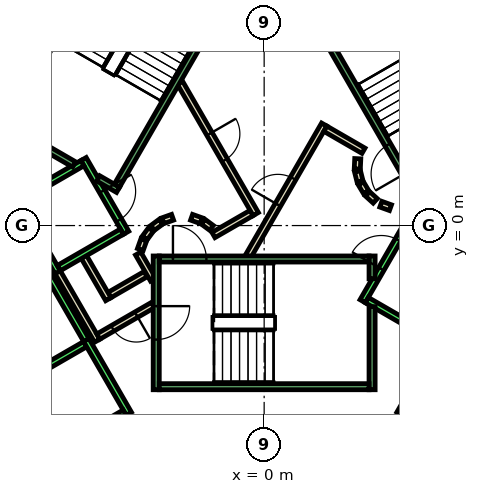
"""IFC4 building model, lengths in metres.
Left out: names, types, materials, properties, quantities, classifications, styles, units other than length and angle.
Written with IfcOpenShell. Run it as: python <this file> out.ifc"""

import sys

from ifc_helpers import new_model, si_unit, direction, frame, frame_2d, origin, place, context, subcontext, project, spatial, polyline, rectangle, outline, extrude, element, fill, save


model = new_model("IFC4")
c1 = context("Model", 3, precision=1e-05, world=origin(), true_north=direction((0.0, 1.0)))
c2 = subcontext(c1, "Body", "Model", "MODEL_VIEW")
j1 = project(units=[si_unit("LENGTHUNIT", "METRE"), si_unit("PLANEANGLEUNIT", "RADIAN")], contexts=[c1])
p1 = place(None, origin())
s1 = spatial("IfcSite", under=j1, at=p1, CompositionType="ELEMENT")
p2 = place(p1, origin())
s2 = spatial("IfcBuilding", under=s1, at=p2, CompositionType="ELEMENT")
p3 = place(p2, frame((0.0, 0.0, -5.5)))
s3 = spatial("IfcBuildingStorey", under=s2, at=p3, CompositionType="ELEMENT", Elevation=-5.5)
p4 = place(p3, frame((0.0, 0.0, -0.42)))
e1 = element("IfcWall", 1, at=p4, inside=s3, PredefinedType="SHEAR", context=c2, shape_type="SweptSolid", body=[
    extrude(outline(polyline([(-12.267, 5.252), (-11.402, 4.752), (-6.351, 13.5), (-6.928, 14.5), (-12.267, 5.252)])), origin(), (0.0, 0.0, 1.0), 5.42),
])
p5 = place(p3, frame((0.0, 0.0, -0.42)))
e2 = element("IfcWall", 2, at=p5, inside=s3, PredefinedType="SHEAR", context=c2, shape_type="SweptSolid", body=[
    extrude(outline(polyline([(-13.856, 2.5), (-6.928, -9.5), (-6.351, -8.5), (-12.702, 2.5), (-13.856, 2.5)])), origin(), (0.0, 0.0, 1.0), 5.42),
])
p6 = place(p3, frame((-3.9, -1.599, 0.0), z_axis=(0.0, 0.0, 1.0), x_axis=(-0.865969445389, -0.500096910261, 0.0)))
e3 = element("IfcWall", 3, at=p6, inside=s3, PredefinedType="PARTITIONING", context=c2, shape_type="SweptSolid", body=[
    extrude(rectangle(XDim=1.373, YDim=0.2, at=frame_2d((0.687, 0.0))), origin(), (0.0, 0.0, 1.0), 4.9),
])
p7 = place(p3, frame((-5.126, -2.422, 0.0), z_axis=(0.0, 0.0, 1.0), x_axis=(-0.500062241894, 0.865989465428, 0.0)))
e4 = element("IfcWall", 4, at=p7, inside=s3, PredefinedType="PARTITIONING", context=c2, shape_type="SweptSolid", body=[
    extrude(rectangle(XDim=1.7, YDim=0.2, at=frame_2d((0.85, 0.0))), origin(), (0.0, 0.0, 1.0), 4.9),
])
p8 = place(p3, frame((-5.492, -3.788, 0.0), z_axis=(0.0, 0.0, 1.0), x_axis=(-0.500008949224, 0.866020236886, 0.0)))
e5 = element("IfcWall", 5, at=p8, inside=s3, PredefinedType="PARTITIONING", context=c2, shape_type="SweptSolid", body=[
    extrude(rectangle(XDim=2.68, YDim=0.2, at=frame_2d((1.34, 0.0))), origin(), (0.0, 0.0, 1.0), 4.9),
])
p9 = place(p3, frame((-4.145, -0.92, 0.0), z_axis=(0.0, 0.0, 1.0), x_axis=(0.499743786207, -0.866173278362, 0.0)))
e6 = element("IfcWall", 6, at=p9, inside=s3, PredefinedType="PARTITIONING", context=c2, shape_type="SweptSolid", body=[
    extrude(rectangle(XDim=0.991, YDim=0.2, at=frame_2d((0.495, 0.0))), origin(), (0.0, 0.0, 1.0), 4.9),
])
p10 = place(p3, frame((-3.65, -2.61, 0.0), z_axis=(0.0, 0.0, 1.0), x_axis=(-0.866072462134, -0.499918483688, 0.0)))
e7 = element("IfcWall", 7, at=p10, inside=s3, PredefinedType="PARTITIONING", context=c2, shape_type="SweptSolid", body=[
    extrude(rectangle(XDim=2.084, YDim=0.2, at=frame_2d((1.042, 0.0))), origin(), (0.0, 0.0, 1.0), 4.9),
])
p11 = place(p10, frame((0.642, 0.0, 0.0)))
e8 = element("IfcOpeningElement", 8, at=p11, cuts=e7, PredefinedType="OPENING", context=c2, shape_type="SweptSolid", body=[
    extrude(rectangle(XDim=0.9, YDim=2.1, at=frame_2d((0.45, 1.05))), frame((0.0, 0.11, 0.0), z_axis=(0.0, -1.0, 0.0), x_axis=(1.0, 0.0, 0.0)), (0.0, 0.0, 1.0), 0.22),
])
p12 = place(p3, frame((3.079, 2.199, 0.0), z_axis=(0.0, 0.0, 1.0), x_axis=(-0.047771483479, -0.998858290933, 0.0)))
e9 = element("IfcWall", 9, at=p12, inside=s3, PredefinedType="PARTITIONING", context=c2, shape_type="SweptSolid", body=[
    extrude(rectangle(XDim=0.337, YDim=0.2, at=frame_2d((0.169, 0.0))), origin(), (0.0, 0.0, 1.0), 4.9),
])
p13 = place(p3, frame((3.07, 1.786, 0.0), z_axis=(0.0, 0.0, 1.0), x_axis=(0.242705583207, -0.970099994784, 0.0)))
e10 = element("IfcWall", 10, at=p13, inside=s3, PredefinedType="PARTITIONING", context=c2, shape_type="SweptSolid", body=[
    extrude(rectangle(XDim=0.338, YDim=0.2, at=frame_2d((0.169, 0.0))), origin(), (0.0, 0.0, 1.0), 4.9),
])
for number, where, z_axis, x_axis in (
    (11, (3.182, 1.388, 0.0), (0.0, 0.0, 1.0), (0.512, -0.859, 0.0)),
    (12, (3.404, 1.039, 0.0), (0.0, 0.0, 1.0), (0.74, -0.672, 0.0)),
):
    element("IfcWall", number, at=place(p3, frame(where, z_axis=z_axis, x_axis=x_axis)), inside=s3, PredefinedType="PARTITIONING", context=c2, shape_type="SweptSolid", body=[
        extrude(rectangle(XDim=0.338, YDim=0.2, at=frame_2d((0.169, 0.0))), origin(), (0.0, 0.0, 1.0), 4.9),
    ])
p14 = place(p3, frame((3.838, 0.702, 0.0), z_axis=(0.0, 0.0, 1.0), x_axis=(0.941035081519, -0.338308993895, 0.0)))
e13 = element("IfcWall", 13, at=p14, inside=s3, PredefinedType="PARTITIONING", context=c2, shape_type="SweptSolid", body=[
    extrude(rectangle(XDim=0.337, YDim=0.2, at=frame_2d((0.168, 0.0))), origin(), (0.0, 0.0, 1.0), 4.9),
])
p15 = place(p3, frame((-0.52, -1.0, 0.0), z_axis=(0.0, 0.0, 1.0), x_axis=(0.50011622646, 0.865958290007, 0.0)))
e14 = element("IfcWall", 14, at=p15, inside=s3, PredefinedType="PARTITIONING", context=c2, shape_type="SweptSolid", body=[
    extrude(rectangle(XDim=4.991, YDim=0.2, at=frame_2d((2.496, 0.0))), origin(), (0.0, 0.0, 1.0), 4.9),
])
p16 = place(p15, frame((1.945, 0.0, 0.0)))
e15 = element("IfcOpeningElement", 15, at=p16, cuts=e14, PredefinedType="OPENING", context=c2, shape_type="SweptSolid", body=[
    extrude(rectangle(XDim=1.0, YDim=2.1, at=frame_2d((0.5, 1.05))), frame((0.0, 0.11, 0.0), z_axis=(0.0, -1.0, 0.0), x_axis=(1.0, 0.0, 0.0)), (0.0, 0.0, 1.0), 0.22),
])
p17 = place(p3, frame((2.012, 3.186, 0.0), z_axis=(0.0, 0.0, 1.0), x_axis=(0.865891012941, -0.500232699559, 0.0)))
e16 = element("IfcWall", 16, at=p17, inside=s3, PredefinedType="PARTITIONING", context=c2, shape_type="SweptSolid", body=[
    extrude(rectangle(XDim=1.449, YDim=0.2, at=frame_2d((0.725, 0.0))), origin(), (0.0, 0.0, 1.0), 4.9),
])
p18 = place(p3, frame((-0.412, 0.414, 0.0), z_axis=(0.0, 0.0, 1.0), x_axis=(-0.866017369001, -0.500013916395, 0.0)))
e17 = element("IfcWall", 17, at=p18, inside=s3, PredefinedType="PARTITIONING", context=c2, shape_type="SweptSolid", body=[
    extrude(rectangle(XDim=1.45, YDim=0.2, at=frame_2d((0.725, 0.0))), origin(), (0.0, 0.0, 1.0), 4.9),
])
p19 = place(p3, frame((-1.731, -0.077, 0.0), z_axis=(0.0, 0.0, 1.0), x_axis=(-0.804311165252, 0.594208338422, 0.0)))
e18 = element("IfcWall", 18, at=p19, inside=s3, PredefinedType="PARTITIONING", context=c2, shape_type="SweptSolid", body=[
    extrude(rectangle(XDim=0.338, YDim=0.2, at=frame_2d((0.169, 0.0))), origin(), (0.0, 0.0, 1.0), 4.9),
])
p20 = place(p3, frame((-2.07, 0.16, 0.0), z_axis=(0.0, 0.0, 1.0), x_axis=(-0.942199461132, 0.335052496547, 0.0)))
e19 = element("IfcWall", 19, at=p20, inside=s3, PredefinedType="PARTITIONING", context=c2, shape_type="SweptSolid", body=[
    extrude(rectangle(XDim=0.337, YDim=0.2, at=frame_2d((0.169, 0.0))), origin(), (0.0, 0.0, 1.0), 4.9),
])
p21 = place(p3, frame((-3.012, 0.273, 0.0), z_axis=(0.0, 0.0, 1.0), x_axis=(-0.942280615813, -0.334824194261, 0.0)))
e20 = element("IfcWall", 20, at=p21, inside=s3, PredefinedType="PARTITIONING", context=c2, shape_type="SweptSolid", body=[
    extrude(rectangle(XDim=0.338, YDim=0.2, at=frame_2d((0.169, 0.0))), origin(), (0.0, 0.0, 1.0), 4.9),
])
p22 = place(p3, frame((-3.397, 0.124, 0.0), z_axis=(0.0, 0.0, 1.0), x_axis=(-0.804311165252, -0.594208338422, 0.0)))
e21 = element("IfcWall", 21, at=p22, inside=s3, PredefinedType="PARTITIONING", context=c2, shape_type="SweptSolid", body=[
    extrude(rectangle(XDim=0.338, YDim=0.2, at=frame_2d((0.169, 0.0))), origin(), (0.0, 0.0, 1.0), 4.9),
])
p23 = place(p3, frame((-3.723, -0.131, 0.0), z_axis=(0.0, 0.0, 1.0), x_axis=(-0.594675113454, -0.803966112121, 0.0)))
e22 = element("IfcWall", 22, at=p23, inside=s3, PredefinedType="PARTITIONING", context=c2, shape_type="SweptSolid", body=[
    extrude(rectangle(XDim=0.338, YDim=0.2, at=frame_2d((0.169, 0.0))), origin(), (0.0, 0.0, 1.0), 4.9),
])
p24 = place(p3, frame((-3.96, -0.47, 0.0), z_axis=(0.0, 0.0, 1.0), x_axis=(-0.334824194261, -0.942280615813, 0.0)))
e23 = element("IfcWall", 23, at=p24, inside=s3, PredefinedType="PARTITIONING", context=c2, shape_type="SweptSolid", body=[
    extrude(rectangle(XDim=0.338, YDim=0.2, at=frame_2d((0.169, 0.0))), origin(), (0.0, 0.0, 1.0), 4.9),
])
p25 = place(p3, frame((-2.771, 4.7, 0.0), z_axis=(0.0, 0.0, 1.0), x_axis=(0.499969479948, -0.866043023828, 0.0)))
e24 = element("IfcWall", 24, at=p25, inside=s3, PredefinedType="PARTITIONING", context=c2, shape_type="SweptSolid", body=[
    extrude(rectangle(XDim=4.99, YDim=0.2, at=frame_2d((2.495, 0.0))), origin(), (0.0, 0.0, 1.0), 4.9),
])
p26 = place(p25, frame((1.945, 0.0, 0.0)))
e25 = element("IfcOpeningElement", 25, at=p26, cuts=e24, PredefinedType="OPENING", context=c2, shape_type="SweptSolid", body=[
    extrude(rectangle(XDim=1.0, YDim=2.1, at=frame_2d((0.5, 1.05))), frame((0.0, 0.11, 0.0), z_axis=(0.0, -1.0, 0.0), x_axis=(1.0, 0.0, 0.0)), (0.0, 0.0, 1.0), 0.22),
])
p27 = place(p3, frame((-5.94, 2.188, 0.0), z_axis=(0.0, 0.0, 1.0), x_axis=(0.49994636267, -0.866056369097, 0.0)))
e26 = element("IfcWall", 26, at=p27, inside=s3, PredefinedType="STANDARD", context=c2, shape_type="SweptSolid", body=[
    extrude(rectangle(XDim=2.8, YDim=0.2, at=frame_2d((1.4, 0.0))), origin(), (0.0, 0.0, 1.0), 4.9),
])
p28 = place(p27, frame((1.225, 0.0, 0.0)))
e27 = element("IfcOpeningElement", 27, at=p28, cuts=e26, PredefinedType="OPENING", context=c2, shape_type="SweptSolid", body=[
    extrude(rectangle(XDim=1.1, YDim=2.1, at=frame_2d((0.55, 1.05))), frame((0.0, 0.11, 0.0), z_axis=(0.0, -1.0, 0.0), x_axis=(1.0, 0.0, 0.0)), (0.0, 0.0, 1.0), 0.22),
])
p29 = place(p3, frame((-8.192, 0.888, 0.0), z_axis=(0.0, 0.0, 1.0), x_axis=(0.49994636267, -0.866056369097, 0.0)))
e28 = element("IfcWall", 28, at=p29, inside=s3, PredefinedType="STANDARD", context=c2, shape_type="SweptSolid", body=[
    extrude(rectangle(XDim=2.8, YDim=0.2, at=frame_2d((1.4, 0.0))), origin(), (0.0, 0.0, 1.0), 4.9),
])
for number, where, z_axis, x_axis in (
    (29, (-5.977, 2.052, 0.0), (0.0, 0.0, 1.0), (-0.866, -0.5, 0.0)),
    (30, (-4.677, -0.2, 0.0), (0.0, 0.0, 1.0), (-0.866, -0.5, 0.0)),
):
    element("IfcWall", number, at=place(p3, frame(where, z_axis=z_axis, x_axis=x_axis)), inside=s3, PredefinedType="STANDARD", context=c2, shape_type="SweptSolid", body=[
        extrude(rectangle(XDim=2.399, YDim=0.2, at=frame_2d((1.2, 0.0))), origin(), (0.0, 0.0, 1.0), 4.9),
    ])
p30 = place(p3, frame((3.24, -2.488, 0.0), z_axis=(0.0, 0.0, 1.0), x_axis=(0.49994636267, 0.866056369097, 0.0)))
e31 = element("IfcWall", 31, at=p30, inside=s3, PredefinedType="STANDARD", context=c2, shape_type="SweptSolid", body=[
    extrude(rectangle(XDim=2.8, YDim=0.2, at=frame_2d((1.4, 0.0))), origin(), (0.0, 0.0, 1.0), 4.9),
])
p31 = place(p30, frame((1.225, 0.0, 0.0)))
e32 = element("IfcOpeningElement", 32, at=p31, cuts=e31, PredefinedType="OPENING", context=c2, shape_type="SweptSolid", body=[
    extrude(rectangle(XDim=1.1, YDim=2.1, at=frame_2d((0.55, 1.05))), frame((0.0, 0.11, 0.0), z_axis=(0.0, -1.0, 0.0), x_axis=(1.0, 0.0, 0.0)), (0.0, 0.0, 1.0), 0.22),
])
p32 = place(p3, frame((3.377, -2.452, 0.0), z_axis=(0.0, 0.0, 1.0), x_axis=(0.865955154139, -0.50012165622, 0.0)))
e33 = element("IfcWall", 33, at=p32, inside=s3, PredefinedType="STANDARD", context=c2, shape_type="SweptSolid", body=[
    extrude(rectangle(XDim=2.4, YDim=0.2, at=frame_2d((1.2, 0.0))), origin(), (0.0, 0.0, 1.0), 4.9),
])
p33 = place(p3, frame((4.451, -6.19, 0.0), z_axis=(0.0, 0.0, 1.0), x_axis=(0.500011755427, 0.866018616679, 0.0)))
e34 = element("IfcWall", 34, at=p33, inside=s3, PredefinedType="STANDARD", context=c2, shape_type="SweptSolid", body=[
    extrude(rectangle(XDim=2.8, YDim=0.2, at=frame_2d((1.4, 0.0))), origin(), (0.0, 0.0, 1.0), 3.6),
])
for number, where, z_axis, x_axis in (
    (35, (-8.451, 0.738, 0.0), (0.0, 0.0, 1.0), (0.5, -0.866, 0.0)),
    (36, (-7.151, -1.513, 0.0), (0.0, 0.0, 1.0), (0.5, -0.866, 0.0)),
):
    element("IfcWall", number, at=place(p3, frame(where, z_axis=z_axis, x_axis=x_axis)), inside=s3, PredefinedType="STANDARD", context=c2, shape_type="SweptSolid", body=[
        extrude(rectangle(XDim=2.8, YDim=0.2, at=frame_2d((1.4, 0.0))), origin(), (0.0, 0.0, 1.0), 3.6),
    ])
p34 = place(p3, frame((-5.888, -3.902, 0.0), z_axis=(0.0, 0.0, 1.0), x_axis=(-0.865999212041, -0.500045362686, 0.0)))
e37 = element("IfcWall", 37, at=p34, inside=s3, PredefinedType="STANDARD", context=c2, shape_type="SweptSolid", body=[
    extrude(rectangle(XDim=2.4, YDim=0.2, at=frame_2d((1.2, 0.0))), origin(), (0.0, 0.0, 1.0), 3.6),
])
for number, where, z_axis, x_axis in (
    (38, (-5.851, -3.765, 0.0), (0.0, 0.0, 1.0), (0.5, -0.866, 0.0)),
    (39, (-8.103, -5.065, 0.0), (0.0, 0.0, 1.0), (0.5, -0.866, 0.0)),
):
    element("IfcWall", number, at=place(p3, frame(where, z_axis=z_axis, x_axis=x_axis)), inside=s3, PredefinedType="STANDARD", context=c2, shape_type="SweptSolid", body=[
        extrude(rectangle(XDim=2.8, YDim=0.2, at=frame_2d((1.4, 0.0))), origin(), (0.0, 0.0, 1.0), 3.6),
    ])
p35 = place(p3, frame((-4.588, -6.153, 0.0), z_axis=(0.0, 0.0, 1.0), x_axis=(-0.865999212041, -0.500045362686, 0.0)))
e40 = element("IfcWall", 40, at=p35, inside=s3, PredefinedType="STANDARD", context=c2, shape_type="SweptSolid", body=[
    extrude(rectangle(XDim=2.4, YDim=0.2, at=frame_2d((1.2, 0.0))), origin(), (0.0, 0.0, 1.0), 3.6),
])
p36 = place(p3, frame((-3.55, -1.0, 0.0), z_axis=(0.0, 0.0, 1.0), x_axis=(0.0, -1.0, 0.0)))
e41 = element("IfcWall", 41, at=p36, inside=s3, PredefinedType="STANDARD", context=c2, shape_type="SweptSolid", body=[
    extrude(rectangle(XDim=4.4, YDim=0.2, at=frame_2d((2.2, 0.0))), origin(), (0.0, 0.0, 1.0), 4.9),
])
p37 = place(p36, frame((1.65, 0.0, 0.0)))
e42 = element("IfcOpeningElement", 42, at=p37, cuts=e41, PredefinedType="OPENING", context=c2, shape_type="SweptSolid", body=[
    extrude(rectangle(XDim=1.1, YDim=2.2, at=frame_2d((0.55, 1.1))), frame((0.0, 0.11, 0.0), z_axis=(0.0, -1.0, 0.0), x_axis=(1.0, 0.0, 0.0)), (0.0, 0.0, 1.0), 0.22),
])
p38 = place(p3, frame((3.55, -2.667, 0.0), z_axis=(0.0, 0.0, 1.0), x_axis=(0.0, -1.0, 0.0)))
e43 = element("IfcWall", 43, at=p38, inside=s3, PredefinedType="STANDARD", context=c2, shape_type="SweptSolid", body=[
    extrude(rectangle(XDim=2.733, YDim=0.2, at=frame_2d((1.366, 0.0))), origin(), (0.0, 0.0, 1.0), 4.9),
])
p39 = place(p3, frame((3.55, -1.0, 0.0), z_axis=(0.0, 0.0, 1.0), x_axis=(0.0, -1.0, 0.0)))
e44 = element("IfcWall", 44, at=p39, inside=s3, PredefinedType="STANDARD", context=c2, shape_type="SweptSolid", body=[
    extrude(rectangle(XDim=0.751, YDim=0.2, at=frame_2d((0.375, 0.0))), origin(), (0.0, 0.0, 1.0), 4.9),
])
p40 = place(p3, frame((-3.45, -1.1, 0.0), z_axis=(0.0, 0.0, 1.0), x_axis=(1.0, 0.0, 0.0)))
e45 = element("IfcWall", 45, at=p40, inside=s3, PredefinedType="STANDARD", context=c2, shape_type="SweptSolid", body=[
    extrude(rectangle(XDim=6.9, YDim=0.2, at=frame_2d((3.45, 0.0))), origin(), (0.0, 0.0, 1.0), 4.9),
])
p41 = place(p40, frame((0.45, 0.0, 0.0)))
e46 = element("IfcOpeningElement", 46, at=p41, cuts=e45, PredefinedType="OPENING", context=c2, shape_type="SweptSolid", body=[
    extrude(rectangle(XDim=1.1, YDim=2.2, at=frame_2d((0.55, 1.1))), frame((0.0, 0.11, 0.0), z_axis=(0.0, -1.0, 0.0), x_axis=(1.0, 0.0, 0.0)), (0.0, 0.0, 1.0), 0.22),
])
p42 = place(p3, frame((-3.45, -5.3, 0.0), z_axis=(0.0, 0.0, 1.0), x_axis=(1.0, 0.0, 0.0)))
e47 = element("IfcWall", 47, at=p42, inside=s3, PredefinedType="STANDARD", context=c2, shape_type="SweptSolid", body=[
    extrude(rectangle(XDim=6.9, YDim=0.2, at=frame_2d((3.45, 0.0))), origin(), (0.0, 0.0, 1.0), 4.9),
])
p43 = place(p3, frame((4.843, 1.312, 0.0), z_axis=(0.0, 0.0, 1.0), x_axis=(-0.499963383562, 0.866046543262, 0.0)))
e48 = element("IfcWall", 48, at=p43, inside=s3, PredefinedType="STANDARD", context=c2, shape_type="SweptSolid", body=[
    extrude(rectangle(XDim=6.9, YDim=0.2, at=frame_2d((3.45, 0.0))), origin(), (0.0, 0.0, 1.0), 4.9),
])
p44 = place(p43, frame((0.45, 0.0, 0.0)))
e49 = element("IfcOpeningElement", 49, at=p44, cuts=e48, PredefinedType="OPENING", context=c2, shape_type="SweptSolid", body=[
    extrude(rectangle(XDim=1.1, YDim=2.2, at=frame_2d((0.55, 1.1))), frame((0.0, 0.11, 0.0), z_axis=(0.0, -1.0, 0.0), x_axis=(1.0, 0.0, 0.0)), (0.0, 0.0, 1.0), 0.22),
])
p45 = place(p3, frame((-6.25, 2.01, 0.0), z_axis=(0.0, 0.0, 1.0), x_axis=(-0.86611865017, 0.499838457731, 0.0)))
e50 = element("IfcWall", 50, at=p45, inside=s3, PredefinedType="STANDARD", context=c2, shape_type="SweptSolid", body=[
    extrude(rectangle(XDim=2.733, YDim=0.2, at=frame_2d((1.366, 0.0))), origin(), (0.0, 0.0, 1.0), 4.9),
])
p46 = place(p3, frame((-4.806, 1.176, 0.0), z_axis=(0.0, 0.0, 1.0), x_axis=(-0.866558586415, 0.499075361355, 0.0)))
e51 = element("IfcWall", 51, at=p46, inside=s3, PredefinedType="STANDARD", context=c2, shape_type="SweptSolid", body=[
    extrude(rectangle(XDim=0.751, YDim=0.2, at=frame_2d((0.376, 0.0))), origin(), (0.0, 0.0, 1.0), 4.9),
])
p47 = place(p3, frame((-1.393, 7.288, 0.0), z_axis=(0.0, 0.0, 1.0), x_axis=(-0.499963383562, -0.866046543262, 0.0)))
e52 = element("IfcWall", 52, at=p47, inside=s3, PredefinedType="STANDARD", context=c2, shape_type="SweptSolid", body=[
    extrude(rectangle(XDim=6.9, YDim=0.2, at=frame_2d((3.45, 0.0))), origin(), (0.0, 0.0, 1.0), 4.9),
])
p48 = place(p47, frame((0.45, 0.0, 0.0)))
e53 = element("IfcOpeningElement", 53, at=p48, cuts=e52, PredefinedType="OPENING", context=c2, shape_type="SweptSolid", body=[
    extrude(rectangle(XDim=1.1, YDim=2.2, at=frame_2d((0.55, 1.1))), frame((0.0, 0.11, 0.0), z_axis=(0.0, -1.0, 0.0), x_axis=(1.0, 0.0, 0.0)), (0.0, 0.0, 1.0), 0.22),
])
p49 = place(p3, frame((-5.03, 9.388, 0.0), z_axis=(0.0, 0.0, 1.0), x_axis=(-0.499978703459, -0.866037698999, 0.0)))
e54 = element("IfcWall", 54, at=p49, inside=s3, PredefinedType="STANDARD", context=c2, shape_type="SweptSolid", body=[
    extrude(rectangle(XDim=6.9, YDim=0.2, at=frame_2d((3.45, 0.0))), origin(), (0.0, 0.0, 1.0), 4.9),
])
p50 = place(p16, origin())
e55 = element("IfcDoor", 55, at=p50, inside=s3, OperationType="SINGLE_SWING_LEFT", PredefinedType="DOOR", context=c2, shape_type="SweptSolid", body=[
    extrude(rectangle(XDim=1.0, YDim=2.1, at=frame_2d((0.5, 1.05))), frame((0.0, 0.025, 0.0), z_axis=(0.0, -1.0, 0.0), x_axis=(1.0, 0.0, 0.0)), (0.0, 0.0, 1.0), 0.05),
])
fill(e15, e55)
p51 = place(p26, origin())
e56 = element("IfcDoor", 56, at=p51, inside=s3, OperationType="SINGLE_SWING_RIGHT", PredefinedType="DOOR", context=c2, shape_type="SweptSolid", body=[
    extrude(rectangle(XDim=1.0, YDim=2.1, at=frame_2d((0.5, 1.05))), frame((0.0, 0.025, 0.0), z_axis=(0.0, -1.0, 0.0), x_axis=(1.0, 0.0, 0.0)), (0.0, 0.0, 1.0), 0.05),
])
fill(e25, e56)
p52 = place(p11, origin())
e57 = element("IfcDoor", 57, at=p52, inside=s3, OperationType="SINGLE_SWING_LEFT", PredefinedType="DOOR", context=c2, shape_type="SweptSolid", body=[
    extrude(rectangle(XDim=0.9, YDim=2.1, at=frame_2d((0.45, 1.05))), frame((0.0, 0.025, 0.0), z_axis=(0.0, -1.0, 0.0), x_axis=(1.0, 0.0, 0.0)), (0.0, 0.0, 1.0), 0.05),
])
fill(e8, e57)
p53 = place(p31, origin())
e58 = element("IfcDoor", 58, at=p53, inside=s3, OperationType="SLIDING_TO_LEFT", PredefinedType="DOOR", context=c2, shape_type="SweptSolid", body=[
    extrude(rectangle(XDim=1.1, YDim=2.1, at=frame_2d((0.55, 1.05))), frame((0.0, 0.025, 0.0), z_axis=(0.0, -1.0, 0.0), x_axis=(1.0, 0.0, 0.0)), (0.0, 0.0, 1.0), 0.05),
])
fill(e32, e58)
p54 = place(p28, origin())
e59 = element("IfcDoor", 59, at=p54, inside=s3, OperationType="SLIDING_TO_LEFT", PredefinedType="DOOR", context=c2, shape_type="SweptSolid", body=[
    extrude(rectangle(XDim=1.1, YDim=2.1, at=frame_2d((0.55, 1.05))), frame((0.0, 0.025, 0.0), z_axis=(0.0, -1.0, 0.0), x_axis=(1.0, 0.0, 0.0)), (0.0, 0.0, 1.0), 0.05),
])
fill(e27, e59)
p55 = place(p41, origin())
e60 = element("IfcDoor", 60, at=p55, inside=s3, OperationType="SINGLE_SWING_LEFT", PredefinedType="DOOR", context=c2, shape_type="SweptSolid", body=[
    extrude(rectangle(XDim=1.1, YDim=2.2, at=frame_2d((0.55, 1.1))), frame((0.0, 0.025, 0.0), z_axis=(0.0, -1.0, 0.0), x_axis=(1.0, 0.0, 0.0)), (0.0, 0.0, 1.0), 0.05),
])
fill(e46, e60)
p56 = place(p37, origin())
e61 = element("IfcDoor", 61, at=p56, inside=s3, OperationType="SINGLE_SWING_LEFT", PredefinedType="DOOR", context=c2, shape_type="SweptSolid", body=[
    extrude(rectangle(XDim=1.1, YDim=2.2, at=frame_2d((0.55, 1.1))), frame((0.0, 0.025, 0.0), z_axis=(0.0, -1.0, 0.0), x_axis=(1.0, 0.0, 0.0)), (0.0, 0.0, 1.0), 0.05),
])
fill(e42, e61)
p57 = place(p44, origin())
e62 = element("IfcDoor", 62, at=p57, inside=s3, OperationType="SINGLE_SWING_LEFT", PredefinedType="DOOR", context=c2, shape_type="SweptSolid", body=[
    extrude(rectangle(XDim=1.1, YDim=2.2, at=frame_2d((0.55, 1.1))), frame((0.0, 0.025, 0.0), z_axis=(0.0, -1.0, 0.0), x_axis=(1.0, 0.0, 0.0)), (0.0, 0.0, 1.0), 0.05),
])
fill(e49, e62)
save(model, sys.argv[1])
